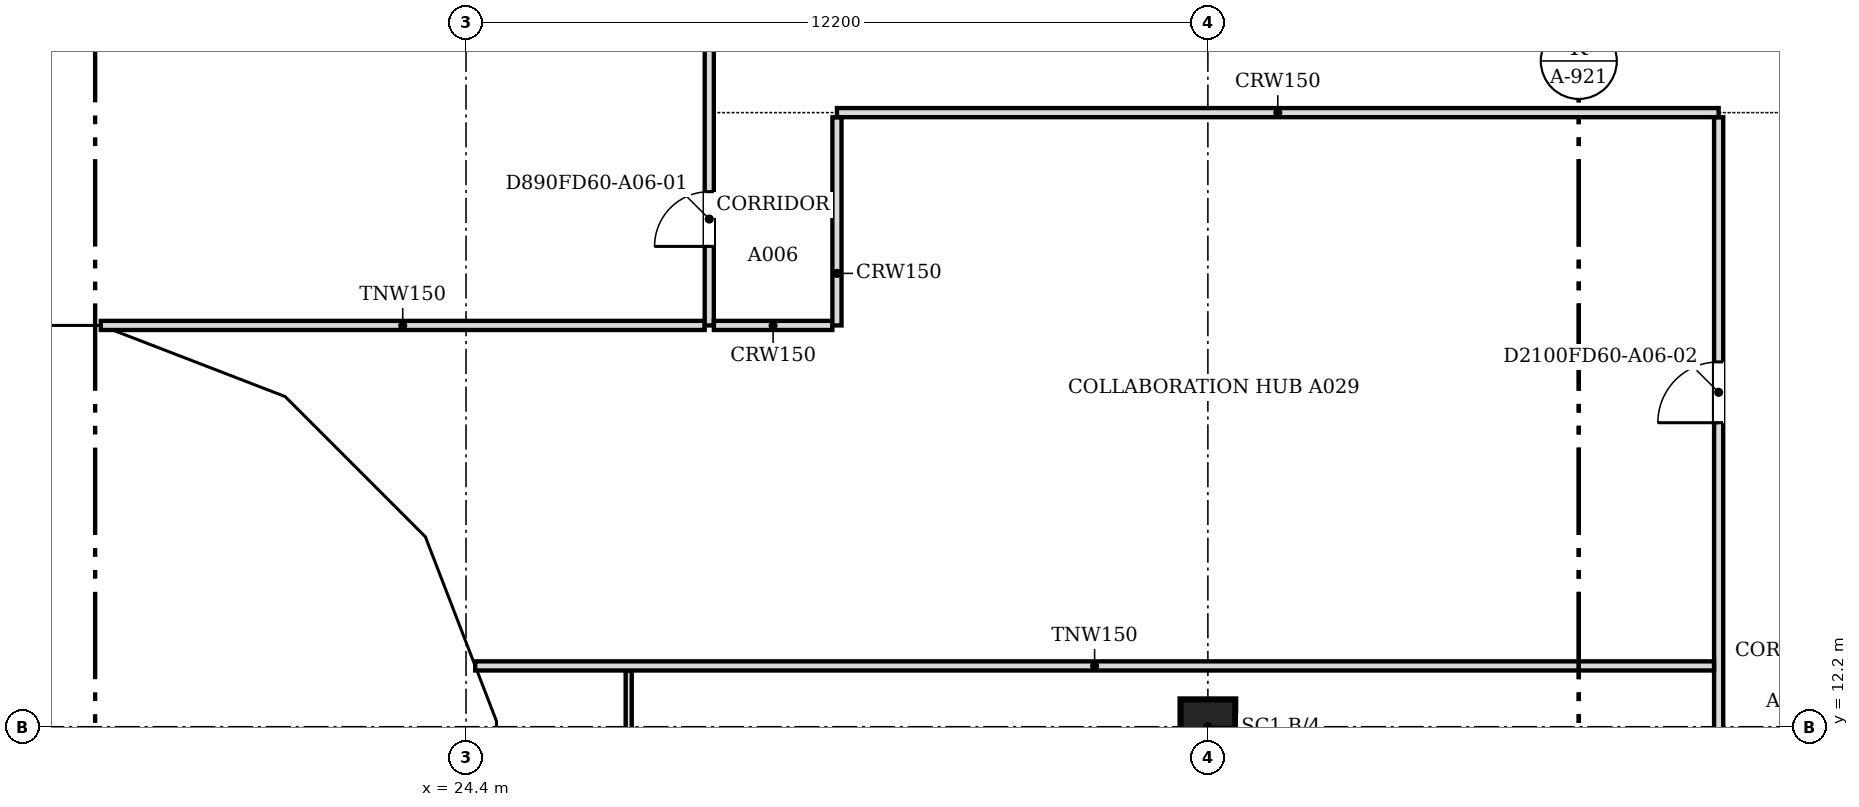
"""IFC4 building model, lengths in metres.
Left out: names, types, materials, properties, quantities, classifications, styles, units other than length and angle.
Written with IfcOpenShell. Run it as: python <this file> out.ifc"""

import sys

from ifc_helpers import new_model, si_unit, direction, frame, frame_2d, origin, origin_2d, place, context, subcontext, project, spatial, polyline, rectangle, outline, extrude, faceted_brep, source, transform, mapped, element, fill, save


model = new_model("IFC4")
c1 = context("Model", 3, precision=1e-05, world=origin(), true_north=direction((0.0, 1.0)))
c2 = subcontext(c1, "Body", "Model", "MODEL_VIEW")
j1 = project(units=[si_unit("LENGTHUNIT", "METRE"), si_unit("PLANEANGLEUNIT", "RADIAN")], contexts=[c1])
p1 = place(None, origin())
s1 = spatial("IfcSite", under=j1, at=p1, CompositionType="ELEMENT")
p2 = place(p1, origin())
s2 = spatial("IfcBuilding", under=s1, at=p2, CompositionType="ELEMENT")
p3 = place(p2, frame((0.0, 0.0, 68.6)))
s3 = spatial("IfcBuildingStorey", under=s2, at=p3, CompositionType="ELEMENT", Elevation=68.6)
p4 = place(p3, frame((36.6, 12.2, 0.0), z_axis=(0.0, 0.0, 1.0), x_axis=(1.0, 0.0, 0.0)))
e1 = element("IfcColumn", 1, at=p4, inside=s3, PredefinedType="COLUMN", context=c2, shape_type="SweptSolid", body=[
    extrude(rectangle(XDim=0.9, YDim=0.9, at=origin_2d()), origin(), (0.0, 0.0, 1.0), 3.6),
])
m1 = source(origin(), c2, "Body", "Brep", [
    faceted_brep([(3.05, -0.25, 3.743), (0.0, -0.25, 0.0), (3.05, -0.25, 0.0), (0.0, 0.25, 0.0), (3.096, 0.25, 3.8), (3.143, 0.25, 3.743), (3.143, 0.25, 0.0), (3.096, -0.0, 3.8)], [[[0, 1, 2]], [[3, 4, 5, 6]], [[5, 4, 7]], [[4, 3, 1, 0, 7]], [[3, 6, 2, 1]], [[2, 6, 5, 7, 0]]]),
])
p5 = place(p3, frame((15.25, 18.55, 0.0), z_axis=(0.0, 0.0, 1.0), x_axis=(1.0, 0.0, 0.0)))
e2 = element("IfcWall", 2, at=p5, inside=s3, PredefinedType="SOLIDWALL", context=c2, shape_type="MappedRepresentation", body=[
    mapped(m1, transform((0.0, 0.0, 0.0), scale=1.0)),
])
m2 = source(origin(), c2, "Body", "SweptSolid", [
    extrude(outline(polyline([(2.896, 3.159), (0.526, 0.25), (2.896, 0.25), (2.896, 3.159)])), frame((0.0, 0.26, 0.0), z_axis=(0.0, -1.0, 0.0), x_axis=(1.0, 0.0, 0.0)), (0.0, 0.0, 1.0), 0.52),
])
p6 = place(p5, origin())
e3 = element("IfcOpeningElement", 3, at=p6, cuts=e2, PredefinedType="OPENING", context=c2, shape_type="MappedRepresentation", body=[
    mapped(m2, transform((0.0, 0.0, 0.0), scale=1.0)),
])
m3 = source(origin(), c2, "Body", "Brep", [
    faceted_brep([(3.143, -0.25, 0.064), (0.093, -0.25, 3.744), (0.093, -0.25, 0.0), (3.143, -0.25, 0.0), (0.0, 0.25, 3.743), (0.047, 0.25, 3.8), (3.196, 0.25, 0.0), (0.0, 0.25, 0.0), (0.047, 0.0, 3.8), (3.196, -0.0, 0.0)], [[[0, 1, 2, 3]], [[4, 5, 6, 7]], [[6, 5, 8, 1, 0, 9]], [[5, 4, 8]], [[7, 6, 9, 3, 2]], [[7, 2, 1, 8, 4]], [[3, 9, 0]]]),
])
p7 = place(p3, frame((18.303, 18.567, 0.0), z_axis=(0.0, 0.0, 1.0), x_axis=(0.932978940178, -0.359930961693, 0.0)))
e4 = element("IfcWall", 4, at=p7, inside=s3, PredefinedType="SOLIDWALL", context=c2, shape_type="MappedRepresentation", body=[
    mapped(m3, transform((0.0, 0.0, 0.0), scale=1.0)),
])
m4 = source(origin(), c2, "Body", "SweptSolid", [
    extrude(outline(polyline([(2.664, 0.25), (0.247, 3.167), (0.247, 0.25), (2.664, 0.25)])), frame((0.0, 0.26, 0.0), z_axis=(0.0, -1.0, 0.0), x_axis=(1.0, 0.0, 0.0)), (0.0, 0.0, 1.0), 0.52),
])
p8 = place(p7, origin())
e5 = element("IfcOpeningElement", 5, at=p8, cuts=e4, PredefinedType="OPENING", context=c2, shape_type="MappedRepresentation", body=[
    mapped(m4, transform((0.0, 0.0, 0.0), scale=1.0)),
])
m5 = source(origin(), c2, "Body", "Brep", [
    faceted_brep([(3.103, -0.25, 3.736), (0.053, -0.25, 0.064), (0.053, -0.25, 0.0), (3.103, -0.25, 0.0), (0.0, 0.25, 0.0), (3.156, 0.25, 3.8), (3.209, 0.25, 3.736), (3.209, 0.25, 0.0), (3.156, -0.0, 3.8), (0.0, 0.0, 0.0)], [[[0, 1, 2, 3]], [[4, 5, 6, 7]], [[6, 5, 8]], [[5, 4, 9, 1, 0, 8]], [[4, 7, 3, 2, 9]], [[9, 2, 1]], [[3, 7, 6, 8, 0]]]),
])
p9 = place(p3, frame((21.285, 17.417, 0.0), z_axis=(0.0, 0.0, 1.0), x_axis=(0.707106781187, -0.707106781187, 0.0)))
e6 = element("IfcWall", 6, at=p9, inside=s3, PredefinedType="SOLIDWALL", context=c2, shape_type="MappedRepresentation", body=[
    mapped(m5, transform((0.0, 0.0, 0.0), scale=1.0)),
])
m6 = source(origin(), c2, "Body", "SweptSolid", [
    extrude(outline(polyline([(2.956, 3.168), (0.533, 0.25), (2.956, 0.25), (2.956, 3.168)])), frame((0.0, 0.26, 0.0), z_axis=(0.0, -1.0, 0.0), x_axis=(1.0, 0.0, 0.0)), (0.0, 0.0, 1.0), 0.52),
])
p10 = place(p9, origin())
e7 = element("IfcOpeningElement", 7, at=p10, cuts=e6, PredefinedType="OPENING", context=c2, shape_type="MappedRepresentation", body=[
    mapped(m6, transform((0.0, 0.0, 0.0), scale=1.0)),
])
m7 = source(origin(), c2, "Body", "Brep", [
    faceted_brep([(3.156, -0.25, 0.056), (0.106, -0.25, 3.736), (0.106, -0.25, 0.0), (3.156, -0.25, 0.0), (0.0, 0.25, 3.736), (0.053, 0.25, 3.8), (3.202, 0.25, 0.0), (0.0, 0.25, 0.0), (0.053, 0.0, 3.8), (3.202, -0.0, 0.0)], [[[0, 1, 2, 3]], [[4, 5, 6, 7]], [[6, 5, 8, 1, 0, 9]], [[5, 4, 8]], [[7, 6, 9, 3, 2]], [[7, 2, 1, 8, 4]], [[3, 9, 0]]]),
])
p11 = place(p3, frame((23.497, 15.234, 0.0), z_axis=(0.0, 0.0, 1.0), x_axis=(0.359913782069, -0.932985567668, 0.0)))
e8 = element("IfcWall", 8, at=p11, inside=s3, PredefinedType="SOLIDWALL", context=c2, shape_type="MappedRepresentation", body=[
    mapped(m7, transform((0.0, 0.0, 0.0), scale=1.0)),
])
m8 = source(origin(), c2, "Body", "SweptSolid", [
    extrude(outline(polyline([(2.671, 0.25), (0.253, 3.167), (0.253, 0.25), (2.671, 0.25)])), frame((0.0, 0.26, 0.0), z_axis=(0.0, -1.0, 0.0), x_axis=(1.0, 0.0, 0.0)), (0.0, 0.0, 1.0), 0.52),
])
p12 = place(p11, origin())
e9 = element("IfcOpeningElement", 9, at=p12, cuts=e8, PredefinedType="OPENING", context=c2, shape_type="MappedRepresentation", body=[
    mapped(m8, transform((0.0, 0.0, 0.0), scale=1.0)),
])
m9 = source(origin(), c2, "Body", "Brep", [
    faceted_brep([(6.1, -0.25, 0.0), (3.096, -0.25, 3.8), (0.047, -0.25, 0.057), (0.047, -0.25, 0.0), (0.0, 0.25, 0.0), (3.096, 0.25, 3.8), (6.053, 0.25, 0.059), (6.053, 0.25, 0.0), (6.1, -0.0, 0.0), (0.0, 0.0, 0.0)], [[[0, 1, 2, 3]], [[4, 5, 6, 7]], [[6, 5, 1, 0, 8]], [[5, 4, 9, 2, 1]], [[4, 7, 8, 0, 3, 9]], [[9, 3, 2]], [[8, 7, 6]]]),
])
p13 = place(p3, frame((24.65, 12.247, 0.0), z_axis=(0.0, 0.0, 1.0), x_axis=(0.0, -1.0, 0.0)))
e10 = element("IfcWall", 10, at=p13, inside=s3, PredefinedType="SOLIDWALL", context=c2, shape_type="MappedRepresentation", body=[
    mapped(m9, transform((0.0, 0.0, 0.0), scale=1.0)),
])
m10 = source(origin(), c2, "Body", "SweptSolid", [
    extrude(outline(polyline([(5.584, 0.25), (3.094, 3.4), (0.526, 0.25), (5.584, 0.25)])), frame((0.0, 0.26, 0.0), z_axis=(0.0, -1.0, 0.0), x_axis=(1.0, 0.0, 0.0)), (0.0, 0.0, 1.0), 0.52),
])
p14 = place(p13, origin())
e11 = element("IfcOpeningElement", 11, at=p14, cuts=e10, PredefinedType="OPENING", context=c2, shape_type="MappedRepresentation", body=[
    mapped(m10, transform((0.0, 0.0, 0.0), scale=1.0)),
])
p15 = place(p2, frame((0.0, 0.0, 72.4)))
s4 = spatial("IfcBuildingStorey", under=s2, at=p15, CompositionType="ELEMENT", Elevation=72.4)
m11 = source(origin(), c2, "Body", "Brep", [
    faceted_brep([(3.05, -0.25, 0.0), (6.1, -0.25, 3.743), (6.1, -0.25, 3.857), (3.05, -0.25, 7.6), (0.0, -0.25, 3.8), (0.0, 0.25, 3.8), (3.05, 0.25, 7.6), (6.146, 0.25, 3.8), (3.05, 0.25, 0.0), (6.146, -0.0, 3.8)], [[[0, 1, 2, 3, 4]], [[5, 6, 7, 8]], [[8, 7, 9, 1, 0]], [[7, 6, 3, 2, 9]], [[6, 5, 4, 3]], [[5, 8, 0, 4]], [[1, 9, 2]]]),
])
p16 = place(p15, frame((12.2, 18.55, -3.8), z_axis=(0.0, 0.0, 1.0), x_axis=(1.0, 0.0, 0.0)))
e12 = element("IfcWall", 12, at=p16, inside=s4, PredefinedType="SOLIDWALL", context=c2, shape_type="MappedRepresentation", body=[
    mapped(m11, transform((0.0, 0.0, 0.0), scale=1.0)),
])
m12 = source(origin(), c2, "Body", "SweptSolid", [
    extrude(outline(polyline([(3.052, 0.397), (5.824, 3.8), (3.052, 7.202), (0.321, 3.8), (3.052, 0.397)])), frame((0.0, 0.26, 0.0), z_axis=(0.0, -1.0, 0.0), x_axis=(1.0, 0.0, 0.0)), (0.0, 0.0, 1.0), 0.52),
])
p17 = place(p16, origin())
e13 = element("IfcOpeningElement", 13, at=p17, cuts=e12, PredefinedType="OPENING", context=c2, shape_type="MappedRepresentation", body=[
    mapped(m12, transform((0.0, 0.0, 0.0), scale=1.0)),
])
m13 = source(origin(), c2, "Body", "Brep", [
    faceted_brep([(3.096, -0.25, 7.536), (0.047, -0.25, 3.856), (0.047, -0.25, 3.744), (3.096, -0.25, 0.064), (0.0, 0.25, 3.8), (3.149, 0.25, 7.6), (3.202, 0.25, 7.536), (3.202, 0.25, 0.064), (3.149, 0.25, 0.0), (3.149, -0.0, 0.0), (3.149, -0.0, 7.6), (0.0, 0.0, 3.8)], [[[0, 1, 2, 3]], [[4, 5, 6, 7, 8]], [[8, 7, 9]], [[6, 5, 10]], [[5, 4, 11, 1, 0, 10]], [[4, 8, 9, 3, 2, 11]], [[11, 2, 1]], [[3, 9, 7, 6, 10, 0]]]),
])
p18 = place(p15, frame((18.346, 18.55, -3.8), z_axis=(0.0, 0.0, 1.0), x_axis=(0.932985567668, -0.359913782069, 0.0)))
e14 = element("IfcWall", 14, at=p18, inside=s4, PredefinedType="SOLIDWALL", context=c2, shape_type="MappedRepresentation", body=[
    mapped(m13, transform((0.0, 0.0, 0.0), scale=1.0)),
])
m14 = source(origin(), c2, "Body", "SweptSolid", [
    extrude(outline(polyline([(2.949, 6.967), (0.325, 3.8), (2.949, 0.633), (2.949, 6.967)])), frame((0.0, 0.26, 0.0), z_axis=(0.0, -1.0, 0.0), x_axis=(1.0, 0.0, 0.0)), (0.0, 0.0, 1.0), 0.52),
])
p19 = place(p18, origin())
e15 = element("IfcOpeningElement", 15, at=p19, cuts=e14, PredefinedType="OPENING", context=c2, shape_type="MappedRepresentation", body=[
    mapped(m14, transform((0.0, 0.0, 0.0), scale=1.0)),
])
m15 = source(origin(), c2, "Body", "Brep", [
    faceted_brep([(0.106, -0.25, 0.064), (3.156, -0.25, 3.736), (3.156, -0.25, 3.864), (0.106, -0.25, 7.536), (0.0, 0.25, 7.536), (0.053, 0.25, 7.6), (3.209, 0.25, 3.8), (0.053, 0.25, 0.0), (0.0, 0.25, 0.064), (3.209, -0.0, 3.8), (0.053, 0.0, 0.0), (0.053, 0.0, 7.6)], [[[0, 1, 2, 3]], [[4, 5, 6, 7, 8]], [[7, 6, 9, 1, 0, 10]], [[6, 5, 11, 3, 2, 9]], [[5, 4, 11]], [[8, 7, 10]], [[8, 10, 0, 3, 11, 4]], [[1, 9, 2]]]),
])
p20 = place(p15, frame((21.248, 17.454, -3.8), z_axis=(0.0, 0.0, 1.0), x_axis=(0.707106781187, -0.707106781187, 0.0)))
e16 = element("IfcWall", 16, at=p20, inside=s4, PredefinedType="SOLIDWALL", context=c2, shape_type="MappedRepresentation", body=[
    mapped(m15, transform((0.0, 0.0, 0.0), scale=1.0)),
])
m16 = source(origin(), c2, "Body", "SweptSolid", [
    extrude(outline(polyline([(0.253, 0.632), (2.884, 3.8), (0.253, 6.968), (0.253, 0.632)])), frame((0.0, 0.26, 0.0), z_axis=(0.0, -1.0, 0.0), x_axis=(1.0, 0.0, 0.0)), (0.0, 0.0, 1.0), 0.52),
])
p21 = place(p20, origin())
e17 = element("IfcOpeningElement", 17, at=p21, cuts=e16, PredefinedType="OPENING", context=c2, shape_type="MappedRepresentation", body=[
    mapped(m16, transform((0.0, 0.0, 0.0), scale=1.0)),
])
m17 = source(origin(), c2, "Body", "Brep", [
    faceted_brep([(3.103, -0.25, 7.544), (0.053, -0.25, 3.864), (0.053, -0.25, 3.736), (3.103, -0.25, 0.056), (0.0, 0.25, 3.8), (3.149, 0.25, 7.6), (3.196, 0.25, 7.543), (3.196, 0.25, 0.057), (3.149, 0.25, 0.0), (3.149, -0.0, 0.0), (3.149, -0.0, 7.6), (0.0, 0.0, 3.8)], [[[0, 1, 2, 3]], [[4, 5, 6, 7, 8]], [[8, 7, 9]], [[6, 5, 10]], [[5, 4, 11, 1, 0, 10]], [[4, 8, 9, 3, 2, 11]], [[11, 2, 1]], [[3, 9, 7, 6, 10, 0]]]),
])
p22 = place(p15, frame((23.517, 15.185, -3.8), z_axis=(0.0, 0.0, 1.0), x_axis=(0.359864468756, -0.933004589553, 0.0)))
e18 = element("IfcWall", 18, at=p22, inside=s4, PredefinedType="SOLIDWALL", context=c2, shape_type="MappedRepresentation", body=[
    mapped(m17, transform((0.0, 0.0, 0.0), scale=1.0)),
])
p23 = place(p22, origin())
e19 = element("IfcOpeningElement", 19, at=p23, cuts=e18, PredefinedType="OPENING", context=c2, shape_type="MappedRepresentation", body=[
    mapped(m14, transform((0.0, 0.0, 0.0), scale=1.0)),
])
m18 = source(origin(), c2, "Body", "Brep", [
    faceted_brep([(0.093, -0.25, 0.057), (3.143, -0.25, 3.8), (0.093, -0.25, 7.543), (0.0, 0.25, 7.544), (0.047, 0.25, 7.6), (3.143, 0.25, 3.8), (0.047, 0.25, 0.0), (0.0, 0.25, 0.056), (0.047, 0.0, 0.0), (0.047, 0.0, 7.6)], [[[0, 1, 2]], [[3, 4, 5, 6, 7]], [[6, 5, 1, 0, 8]], [[5, 4, 9, 2, 1]], [[4, 3, 9]], [[7, 6, 8]], [[7, 8, 0, 2, 9, 3]]]),
])
p24 = place(p15, frame((24.65, 12.293, -3.8), z_axis=(0.0, 0.0, 1.0), x_axis=(0.0, -1.0, 0.0)))
e20 = element("IfcWall", 20, at=p24, inside=s4, PredefinedType="SOLIDWALL", context=c2, shape_type="MappedRepresentation", body=[
    mapped(m18, transform((0.0, 0.0, 0.0), scale=1.0)),
])
m19 = source(origin(), c2, "Body", "SweptSolid", [
    extrude(outline(polyline([(0.247, 0.641), (2.821, 3.8), (0.247, 6.959), (0.247, 0.641)])), frame((0.0, 0.26, 0.0), z_axis=(0.0, -1.0, 0.0), x_axis=(1.0, 0.0, 0.0)), (0.0, 0.0, 1.0), 0.52),
])
p25 = place(p24, origin())
e21 = element("IfcOpeningElement", 21, at=p25, cuts=e20, PredefinedType="OPENING", context=c2, shape_type="MappedRepresentation", body=[
    mapped(m19, transform((0.0, 0.0, 0.0), scale=1.0)),
])
p26 = place(p3, frame((45.0, 0.5, 0.0), z_axis=(0.0, 0.0, 1.0), x_axis=(0.0, 1.0, 0.0)))
e22 = element("IfcWall", 22, at=p26, inside=s3, PredefinedType="PARTITIONING", context=c2, shape_type="SweptSolid", body=[
    extrude(rectangle(XDim=21.724, YDim=0.15, at=frame_2d((10.862, 0.0))), origin(), (0.0, 0.0, 1.0), 3.067),
])
m20 = source(origin(), c2, "Body", "SweptSolid", [
    extrude(rectangle(XDim=0.9, YDim=2.1, at=frame_2d((0.45, 1.05))), frame((0.0, 0.085, 0.0), z_axis=(0.0, -1.0, 0.0), x_axis=(1.0, 0.0, 0.0)), (0.0, 0.0, 1.0), 0.17),
])
p27 = place(p26, frame((7.7, 0.0, 0.0)))
e23 = element("IfcOpeningElement", 23, at=p27, cuts=e22, PredefinedType="OPENING", context=c2, shape_type="MappedRepresentation", body=[
    mapped(m20, transform((0.0, 0.0, 0.0), scale=1.0)),
])
m21 = source(origin(), c2, "Body", "SweptSolid", [
    extrude(rectangle(XDim=1.0, YDim=2.1, at=frame_2d((0.5, 1.05))), frame((0.0, 0.085, 0.0), z_axis=(0.0, -1.0, 0.0), x_axis=(1.0, 0.0, 0.0)), (0.0, 0.0, 1.0), 0.17),
])
p28 = place(p26, frame((16.7, 0.0, 0.0)))
e24 = element("IfcOpeningElement", 24, at=p28, cuts=e22, PredefinedType="OPENING", context=c2, shape_type="MappedRepresentation", body=[
    mapped(m21, transform((0.0, 0.0, 0.0), scale=1.0)),
])
p29 = place(p3, frame((27.075, 4.2, 0.0), z_axis=(0.0, 0.0, 1.0), x_axis=(0.0, 1.0, 0.0)))
e25 = element("IfcWall", 25, at=p29, inside=s3, PredefinedType="PARTITIONING", context=c2, shape_type="SweptSolid", body=[
    extrude(rectangle(XDim=8.924, YDim=0.1, at=frame_2d((4.462, 0.0))), origin(), (0.0, 0.0, 1.0), 3.067),
])
m22 = source(origin(), c2, "Body", "SweptSolid", [
    extrude(rectangle(XDim=0.9, YDim=2.1, at=frame_2d((0.45, 1.05))), frame((0.0, 0.06, 0.0), z_axis=(0.0, -1.0, 0.0), x_axis=(1.0, 0.0, 0.0)), (0.0, 0.0, 1.0), 0.12),
])
p30 = place(p29, frame((6.148, 0.0, 0.0)))
e26 = element("IfcOpeningElement", 26, at=p30, cuts=e25, PredefinedType="OPENING", context=c2, shape_type="MappedRepresentation", body=[
    mapped(m22, transform((0.0, 0.0, 0.0), scale=1.0)),
])
p31 = place(p29, frame((1.7, 0.0, 0.0)))
e27 = element("IfcOpeningElement", 27, at=p31, cuts=e25, PredefinedType="OPENING", context=c2, shape_type="MappedRepresentation", body=[
    mapped(m22, transform((0.0, 0.0, 0.0), scale=1.0)),
])
p32 = place(p3, frame((24.55, 13.2, 0.0), z_axis=(0.0, 0.0, 1.0), x_axis=(1.0, 0.0, 0.0)))
e28 = element("IfcWall", 28, at=p32, inside=s3, PredefinedType="PARTITIONING", context=c2, shape_type="SweptSolid", body=[
    extrude(rectangle(XDim=20.374, YDim=0.15, at=frame_2d((10.187, 0.0))), origin(), (0.0, 0.0, 1.0), 3.067),
])
p33 = place(p3, frame((18.393, 18.8, 0.0), z_axis=(0.0, 0.0, 1.0), x_axis=(1.0, 0.0, 0.0)))
e29 = element("IfcWall", 29, at=p33, inside=s3, PredefinedType="PARTITIONING", context=c2, shape_type="SweptSolid", body=[
    extrude(rectangle(XDim=9.931, YDim=0.15, at=frame_2d((4.965, 0.0))), origin(), (0.0, 0.0, 1.0), 3.067),
])
p34 = place(p3, frame((28.4, 18.8, 0.0), z_axis=(0.0, 0.0, 1.0), x_axis=(0.0, 1.0, 0.0)))
e30 = element("IfcWall", 30, at=p34, inside=s3, PredefinedType="PARTITIONING", context=c2, shape_type="SweptSolid", body=[
    extrude(rectangle(XDim=26.824, YDim=0.15, at=frame_2d((13.412, 0.0))), origin(), (0.0, 0.0, 1.0), 3.067),
])
p35 = place(p34, frame((1.3, 0.0, 0.0)))
e31 = element("IfcOpeningElement", 31, at=p35, cuts=e30, PredefinedType="OPENING", context=c2, shape_type="MappedRepresentation", body=[
    mapped(m20, transform((0.0, 0.0, 0.0), scale=1.0)),
])
p36 = place(p34, frame((23.351, 0.0, 0.0)))
e32 = element("IfcOpeningElement", 32, at=p36, cuts=e30, PredefinedType="OPENING", context=c2, shape_type="MappedRepresentation", body=[
    mapped(m20, transform((0.0, 0.0, 0.0), scale=1.0)),
])
p37 = place(p34, frame((17.351, 0.0, 0.0)))
e33 = element("IfcOpeningElement", 33, at=p37, cuts=e30, PredefinedType="OPENING", context=c2, shape_type="MappedRepresentation", body=[
    mapped(m20, transform((0.0, 0.0, 0.0), scale=1.0)),
])
p38 = place(p34, frame((9.7, 0.0, 0.0)))
e34 = element("IfcOpeningElement", 34, at=p38, cuts=e30, PredefinedType="OPENING", context=c2, shape_type="MappedRepresentation", body=[
    mapped(m20, transform((0.0, 0.0, 0.0), scale=1.0)),
])
p39 = place(p3, frame((28.476, 18.8, 0.0), z_axis=(0.0, 0.0, 1.0), x_axis=(1.0, 0.0, 0.0)))
e35 = element("IfcWall", 35, at=p39, inside=s3, PredefinedType="PARTITIONING", context=c2, shape_type="SweptSolid", body=[
    extrude(rectangle(XDim=1.948, YDim=0.15, at=frame_2d((0.974, 0.0))), origin(), (0.0, 0.0, 1.0), 3.067),
])
p40 = place(p3, frame((30.5, 18.8, 0.0), z_axis=(0.0, 0.0, 1.0), x_axis=(0.0, 1.0, 0.0)))
e36 = element("IfcWall", 36, at=p40, inside=s3, PredefinedType="PARTITIONING", context=c2, shape_type="SweptSolid", body=[
    extrude(rectangle(XDim=3.424, YDim=0.15, at=frame_2d((1.712, 0.0))), origin(), (0.0, 0.0, 1.0), 3.067),
])
p41 = place(p3, frame((30.5, 22.3, 0.0), z_axis=(0.0, 0.0, 1.0), x_axis=(1.0, 0.0, 0.0)))
e37 = element("IfcWall", 37, at=p41, inside=s3, PredefinedType="PARTITIONING", context=c2, shape_type="SweptSolid", body=[
    extrude(rectangle(XDim=14.5, YDim=0.15, at=frame_2d((7.25, 0.0))), origin(), (0.0, 0.0, 1.0), 3.067),
])
m23 = source(origin(), c2, "Body", "SweptSolid", [
    extrude(rectangle(XDim=0.9, YDim=2.1, at=frame_2d((0.45, 1.05))), frame((0.0, 0.025, 0.0), z_axis=(0.0, -1.0, 0.0), x_axis=(1.0, 0.0, 0.0)), (0.0, 0.0, 1.0), 0.05),
])
p42 = place(p35, origin())
e38 = element("IfcDoor", 38, at=p42, inside=s3, OperationType="SINGLE_SWING_LEFT", PredefinedType="DOOR", context=c2, shape_type="MappedRepresentation", body=[
    mapped(m23, transform((0.0, 0.0, 0.0), scale=1.0)),
])
fill(e31, e38)
m24 = source(origin(), c2, "Body", "SweptSolid", [
    extrude(rectangle(XDim=1.0, YDim=2.1, at=frame_2d((0.5, 1.05))), frame((0.0, 0.025, 0.0), z_axis=(0.0, -1.0, 0.0), x_axis=(1.0, 0.0, 0.0)), (0.0, 0.0, 1.0), 0.05),
])
p43 = place(p28, origin())
e39 = element("IfcDoor", 39, at=p43, inside=s3, OperationType="SINGLE_SWING_LEFT", PredefinedType="DOOR", context=c2, shape_type="MappedRepresentation", body=[
    mapped(m24, transform((0.0, 0.0, 0.0), scale=1.0)),
])
fill(e24, e39)
save(model, sys.argv[1])
